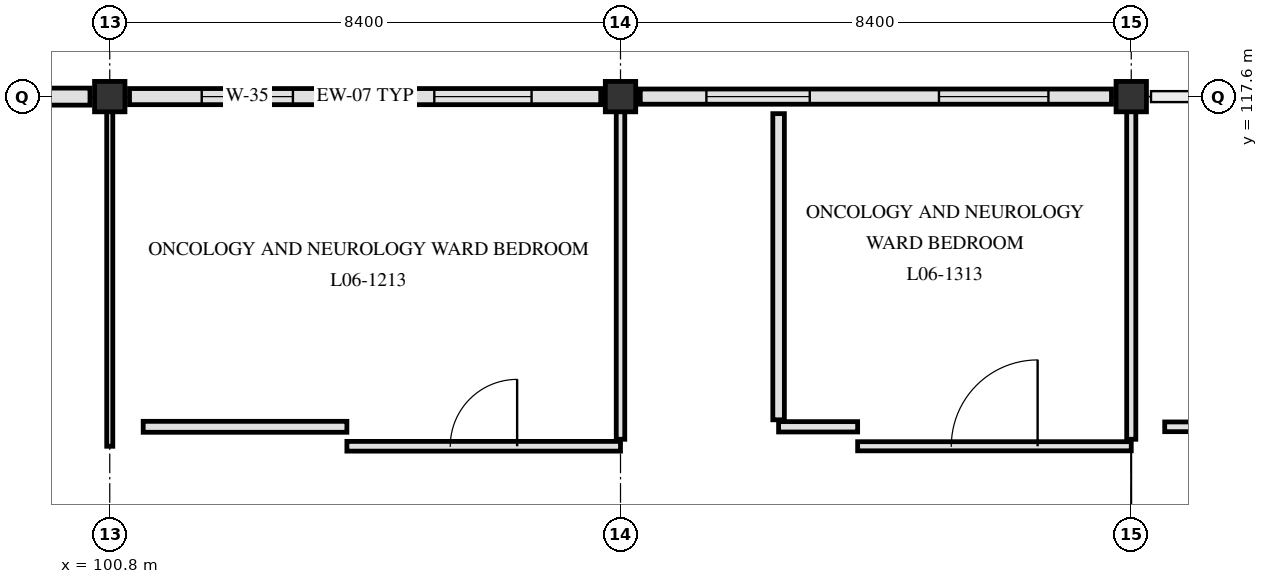
"""IFC4 building model, lengths in metres.
Left out: names, types, materials, properties, quantities, classifications, styles, units other than length and angle.
Written with IfcOpenShell. Run it as: python <this file> out.ifc"""

import sys

from ifc_helpers import new_model, si_unit, direction, frame, frame_2d, origin, origin_2d, place, context, subcontext, project, spatial, rectangle, extrude, element, fill, save


model = new_model("IFC4")
c1 = context("Model", 3, precision=1e-05, world=origin(), true_north=direction((0.0, 1.0)))
c2 = subcontext(c1, "Body", "Model", "MODEL_VIEW")
j1 = project(units=[si_unit("LENGTHUNIT", "METRE"), si_unit("PLANEANGLEUNIT", "RADIAN")], contexts=[c1])
p1 = place(None, origin())
s1 = spatial("IfcSite", under=j1, at=p1, CompositionType="ELEMENT")
p2 = place(p1, origin())
s2 = spatial("IfcBuilding", under=s1, at=p2, CompositionType="ELEMENT")
p3 = place(p2, frame((0.0, 0.0, 26.4)))
s3 = spatial("IfcBuildingStorey", under=s2, at=p3, CompositionType="ELEMENT", Elevation=26.4)
for number, where, z_axis, x_axis in (
    (1, (100.8, 117.6, 0.0), (0.0, 0.0, 1.0), (1.0, 0.0, 0.0)),
    (2, (109.2, 117.6, 0.0), (0.0, 0.0, 1.0), (1.0, 0.0, 0.0)),
    (3, (117.6, 117.6, 0.0), (0.0, 0.0, 1.0), (1.0, 0.0, 0.0)),
):
    element("IfcColumn", number, at=place(p3, frame(where, z_axis=z_axis, x_axis=x_axis)), inside=s3, PredefinedType="COLUMN", context=c2, shape_type="SweptSolid", body=[
        extrude(rectangle(XDim=0.5, YDim=0.5, at=origin_2d()), origin(), (0.0, 0.0, 1.0), 3.9),
    ])
p4 = place(p3, frame((92.725, 117.6, 0.0), z_axis=(0.0, 0.0, 1.0), x_axis=(1.0, 0.0, 0.0)))
e4 = element("IfcWall", 4, at=p4, inside=s3, PredefinedType="SOLIDWALL", context=c2, shape_type="SweptSolid", body=[
    extrude(rectangle(XDim=7.75, YDim=0.28, at=frame_2d((3.875, 0.0))), origin(), (0.0, 0.0, 1.0), 3.36),
])
p5 = place(p4, frame((1.288, 0.0, 0.85)))
e5 = element("IfcOpeningElement", 5, at=p5, cuts=e4, PredefinedType="OPENING", context=c2, shape_type="SweptSolid", body=[
    extrude(rectangle(XDim=1.3, YDim=1.66, at=frame_2d((0.65, 0.83))), frame((0.0, 0.15, 0.0), z_axis=(0.0, -1.0, 0.0), x_axis=(1.0, 0.0, 0.0)), (0.0, 0.0, 1.0), 0.3),
])
p6 = place(p4, frame((5.113, 0.0, 0.85)))
e6 = element("IfcOpeningElement", 6, at=p6, cuts=e4, PredefinedType="OPENING", context=c2, shape_type="SweptSolid", body=[
    extrude(rectangle(XDim=1.4, YDim=1.66, at=frame_2d((0.7, 0.83))), frame((0.0, 0.15, 0.0), z_axis=(0.0, -1.0, 0.0), x_axis=(1.0, 0.0, 0.0)), (0.0, 0.0, 1.0), 0.3),
])
p7 = place(p3, frame((101.125, 117.6, 0.0), z_axis=(0.0, 0.0, 1.0), x_axis=(1.0, 0.0, 0.0)))
e7 = element("IfcWall", 7, at=p7, inside=s3, PredefinedType="SOLIDWALL", context=c2, shape_type="SweptSolid", body=[
    extrude(rectangle(XDim=7.75, YDim=0.265, at=frame_2d((3.875, 0.0))), origin(), (0.0, 0.0, 1.0), 3.36),
])
p8 = place(p7, frame((1.188, 0.0, 0.85)))
e8 = element("IfcOpeningElement", 8, at=p8, cuts=e7, PredefinedType="OPENING", context=c2, shape_type="SweptSolid", body=[
    extrude(rectangle(XDim=1.5, YDim=1.66, at=frame_2d((0.75, 0.83))), frame((0.0, 0.142, 0.0), z_axis=(0.0, -1.0, 0.0), x_axis=(1.0, 0.0, 0.0)), (0.0, 0.0, 1.0), 0.285),
])
p9 = place(p7, frame((5.012, 0.0, 0.85)))
e9 = element("IfcOpeningElement", 9, at=p9, cuts=e7, PredefinedType="OPENING", context=c2, shape_type="SweptSolid", body=[
    extrude(rectangle(XDim=1.6, YDim=1.66, at=frame_2d((0.8, 0.83))), frame((0.0, 0.142, 0.0), z_axis=(0.0, -1.0, 0.0), x_axis=(1.0, 0.0, 0.0)), (0.0, 0.0, 1.0), 0.285),
])
p10 = place(p3, frame((109.525, 117.6, 0.0), z_axis=(0.0, 0.0, 1.0), x_axis=(1.0, 0.0, 0.0)))
e10 = element("IfcWall", 10, at=p10, inside=s3, PredefinedType="SOLIDWALL", context=c2, shape_type="SweptSolid", body=[
    extrude(rectangle(XDim=7.75, YDim=0.25, at=frame_2d((3.875, 0.0))), origin(), (0.0, 0.0, 1.0), 3.36),
])
p11 = place(p10, frame((1.087, 0.0, 0.85)))
e11 = element("IfcOpeningElement", 11, at=p11, cuts=e10, PredefinedType="OPENING", context=c2, shape_type="SweptSolid", body=[
    extrude(rectangle(XDim=1.7, YDim=1.66, at=frame_2d((0.85, 0.83))), frame((0.0, 0.135, 0.0), z_axis=(0.0, -1.0, 0.0), x_axis=(1.0, 0.0, 0.0)), (0.0, 0.0, 1.0), 0.27),
])
p12 = place(p10, frame((4.913, 0.0, 0.85)))
e12 = element("IfcOpeningElement", 12, at=p12, cuts=e10, PredefinedType="OPENING", context=c2, shape_type="SweptSolid", body=[
    extrude(rectangle(XDim=1.8, YDim=1.66, at=frame_2d((0.9, 0.83))), frame((0.0, 0.135, 0.0), z_axis=(0.0, -1.0, 0.0), x_axis=(1.0, 0.0, 0.0)), (0.0, 0.0, 1.0), 0.27),
])
p13 = place(p3, frame((104.7, 111.85, 0.0), z_axis=(0.0, 0.0, 1.0), x_axis=(1.0, 0.0, 0.0)))
e13 = element("IfcWall", 13, at=p13, inside=s3, PredefinedType="PARTITIONING", context=c2, shape_type="SweptSolid", body=[
    extrude(rectangle(XDim=4.5, YDim=0.16, at=frame_2d((2.25, 0.0))), origin(), (0.0, 0.0, 1.0), 3.21),
])
p14 = place(p13, frame((1.7, 0.0, 0.0)))
e14 = element("IfcOpeningElement", 14, at=p14, cuts=e13, PredefinedType="OPENING", context=c2, shape_type="SweptSolid", body=[
    extrude(rectangle(XDim=1.1, YDim=2.15, at=frame_2d((0.55, 1.075))), frame((0.0, 0.09, 0.0), z_axis=(0.0, -1.0, 0.0), x_axis=(1.0, 0.0, 0.0)), (0.0, 0.0, 1.0), 0.18),
])
p15 = place(p3, frame((113.1, 111.85, 0.0), z_axis=(0.0, 0.0, 1.0), x_axis=(1.0, 0.0, 0.0)))
e15 = element("IfcWall", 15, at=p15, inside=s3, PredefinedType="PARTITIONING", context=c2, shape_type="SweptSolid", body=[
    extrude(rectangle(XDim=4.5, YDim=0.15, at=frame_2d((2.25, 0.0))), origin(), (0.0, 0.0, 1.0), 3.21),
])
p16 = place(p15, frame((1.54, 0.0, 0.0)))
e16 = element("IfcOpeningElement", 16, at=p16, cuts=e15, PredefinedType="OPENING", context=c2, shape_type="SweptSolid", body=[
    extrude(rectangle(XDim=1.42, YDim=2.22, at=frame_2d((0.71, 1.11))), frame((0.0, 0.085, 0.0), z_axis=(0.0, -1.0, 0.0), x_axis=(1.0, 0.0, 0.0)), (0.0, 0.0, 1.0), 0.17),
])
p17 = place(p3, frame((101.35, 112.17, 0.0), z_axis=(0.0, 0.0, 1.0), x_axis=(1.0, 0.0, 0.0)))
e17 = element("IfcWall", 17, at=p17, inside=s3, PredefinedType="PARTITIONING", context=c2, shape_type="SweptSolid", body=[
    extrude(rectangle(XDim=3.35, YDim=0.18, at=frame_2d((1.675, 0.0))), origin(), (0.0, 0.0, 1.0), 3.34),
])
p18 = place(p3, frame((111.8, 112.17, 0.0), z_axis=(0.0, 0.0, 1.0), x_axis=(1.0, 0.0, 0.0)))
e18 = element("IfcWall", 18, at=p18, inside=s3, PredefinedType="PARTITIONING", context=c2, shape_type="SweptSolid", body=[
    extrude(rectangle(XDim=1.3, YDim=0.17, at=frame_2d((0.65, 0.0))), origin(), (0.0, 0.0, 1.0), 3.34),
])
p19 = place(p3, frame((118.15, 112.17, 0.0), z_axis=(0.0, 0.0, 1.0), x_axis=(1.0, 0.0, 0.0)))
e19 = element("IfcWall", 19, at=p19, inside=s3, PredefinedType="PARTITIONING", context=c2, shape_type="SweptSolid", body=[
    extrude(rectangle(XDim=3.35, YDim=0.16, at=frame_2d((1.675, 0.0))), origin(), (0.0, 0.0, 1.0), 3.34),
])
p20 = place(p3, frame((100.8, 111.85, 0.0), z_axis=(0.0, 0.0, 1.0), x_axis=(0.0, 1.0, 0.0)))
e20 = element("IfcWall", 20, at=p20, inside=s3, PredefinedType="PARTITIONING", context=c2, shape_type="SweptSolid", body=[
    extrude(rectangle(XDim=5.505, YDim=0.1, at=frame_2d((2.752, 0.0))), origin(), (0.0, 0.0, 1.0), 3.21),
])
p21 = place(p3, frame((109.2, 111.965, 0.0), z_axis=(0.0, 0.0, 1.0), x_axis=(0.0, 1.0, 0.0)))
e21 = element("IfcWall", 21, at=p21, inside=s3, PredefinedType="PARTITIONING", context=c2, shape_type="SweptSolid", body=[
    extrude(rectangle(XDim=5.39, YDim=0.14, at=frame_2d((2.695, 0.0))), origin(), (0.0, 0.0, 1.0), 3.21),
])
p22 = place(p3, frame((111.8, 112.285, 0.0), z_axis=(0.0, 0.0, 1.0), x_axis=(0.0, 1.0, 0.0)))
e22 = element("IfcWall", 22, at=p22, inside=s3, PredefinedType="PARTITIONING", context=c2, shape_type="SweptSolid", body=[
    extrude(rectangle(XDim=5.035, YDim=0.19, at=frame_2d((2.518, 0.0))), origin(), (0.0, 0.0, 1.0), 3.34),
])
p23 = place(p3, frame((117.6, 111.965, 0.0), z_axis=(0.0, 0.0, 1.0), x_axis=(0.0, 1.0, 0.0)))
e23 = element("IfcWall", 23, at=p23, inside=s3, PredefinedType="PARTITIONING", context=c2, shape_type="SweptSolid", body=[
    extrude(rectangle(XDim=5.39, YDim=0.15, at=frame_2d((2.695, 0.0))), origin(), (0.0, 0.0, 1.0), 3.21),
])
p24 = place(p8, origin())
e24 = element("IfcWindow", 24, at=p24, inside=s3, PartitioningType="SINGLE_PANEL", PredefinedType="WINDOW", context=c2, shape_type="SweptSolid", body=[
    extrude(rectangle(XDim=1.5, YDim=1.66, at=frame_2d((0.75, 0.83))), frame((0.0, 0.03, 0.0), z_axis=(0.0, -1.0, 0.0), x_axis=(1.0, 0.0, 0.0)), (0.0, 0.0, 1.0), 0.06),
])
fill(e8, e24)
p25 = place(p9, origin())
e25 = element("IfcWindow", 25, at=p25, inside=s3, PartitioningType="SINGLE_PANEL", PredefinedType="WINDOW", context=c2, shape_type="SweptSolid", body=[
    extrude(rectangle(XDim=1.6, YDim=1.66, at=frame_2d((0.8, 0.83))), frame((0.0, 0.03, 0.0), z_axis=(0.0, -1.0, 0.0), x_axis=(1.0, 0.0, 0.0)), (0.0, 0.0, 1.0), 0.06),
])
fill(e9, e25)
p26 = place(p11, origin())
e26 = element("IfcWindow", 26, at=p26, inside=s3, PartitioningType="SINGLE_PANEL", PredefinedType="WINDOW", context=c2, shape_type="SweptSolid", body=[
    extrude(rectangle(XDim=1.7, YDim=1.66, at=frame_2d((0.85, 0.83))), frame((0.0, 0.03, 0.0), z_axis=(0.0, -1.0, 0.0), x_axis=(1.0, 0.0, 0.0)), (0.0, 0.0, 1.0), 0.06),
])
fill(e11, e26)
p27 = place(p12, origin())
e27 = element("IfcWindow", 27, at=p27, inside=s3, PartitioningType="SINGLE_PANEL", PredefinedType="WINDOW", context=c2, shape_type="SweptSolid", body=[
    extrude(rectangle(XDim=1.8, YDim=1.66, at=frame_2d((0.9, 0.83))), frame((0.0, 0.03, 0.0), z_axis=(0.0, -1.0, 0.0), x_axis=(1.0, 0.0, 0.0)), (0.0, 0.0, 1.0), 0.06),
])
fill(e12, e27)
p28 = place(p14, origin())
e28 = element("IfcDoor", 28, at=p28, inside=s3, OperationType="SINGLE_SWING_RIGHT", PredefinedType="DOOR", context=c2, shape_type="SweptSolid", body=[
    extrude(rectangle(XDim=1.1, YDim=2.15, at=frame_2d((0.55, 1.075))), frame((0.0, 0.025, 0.0), z_axis=(0.0, -1.0, 0.0), x_axis=(1.0, 0.0, 0.0)), (0.0, 0.0, 1.0), 0.05),
])
fill(e14, e28)
p29 = place(p16, origin())
e29 = element("IfcDoor", 29, at=p29, inside=s3, OperationType="SINGLE_SWING_RIGHT", PredefinedType="DOOR", context=c2, shape_type="SweptSolid", body=[
    extrude(rectangle(XDim=1.42, YDim=2.22, at=frame_2d((0.71, 1.11))), frame((0.0, 0.025, 0.0), z_axis=(0.0, -1.0, 0.0), x_axis=(1.0, 0.0, 0.0)), (0.0, 0.0, 1.0), 0.05),
])
fill(e16, e29)
save(model, sys.argv[1])
